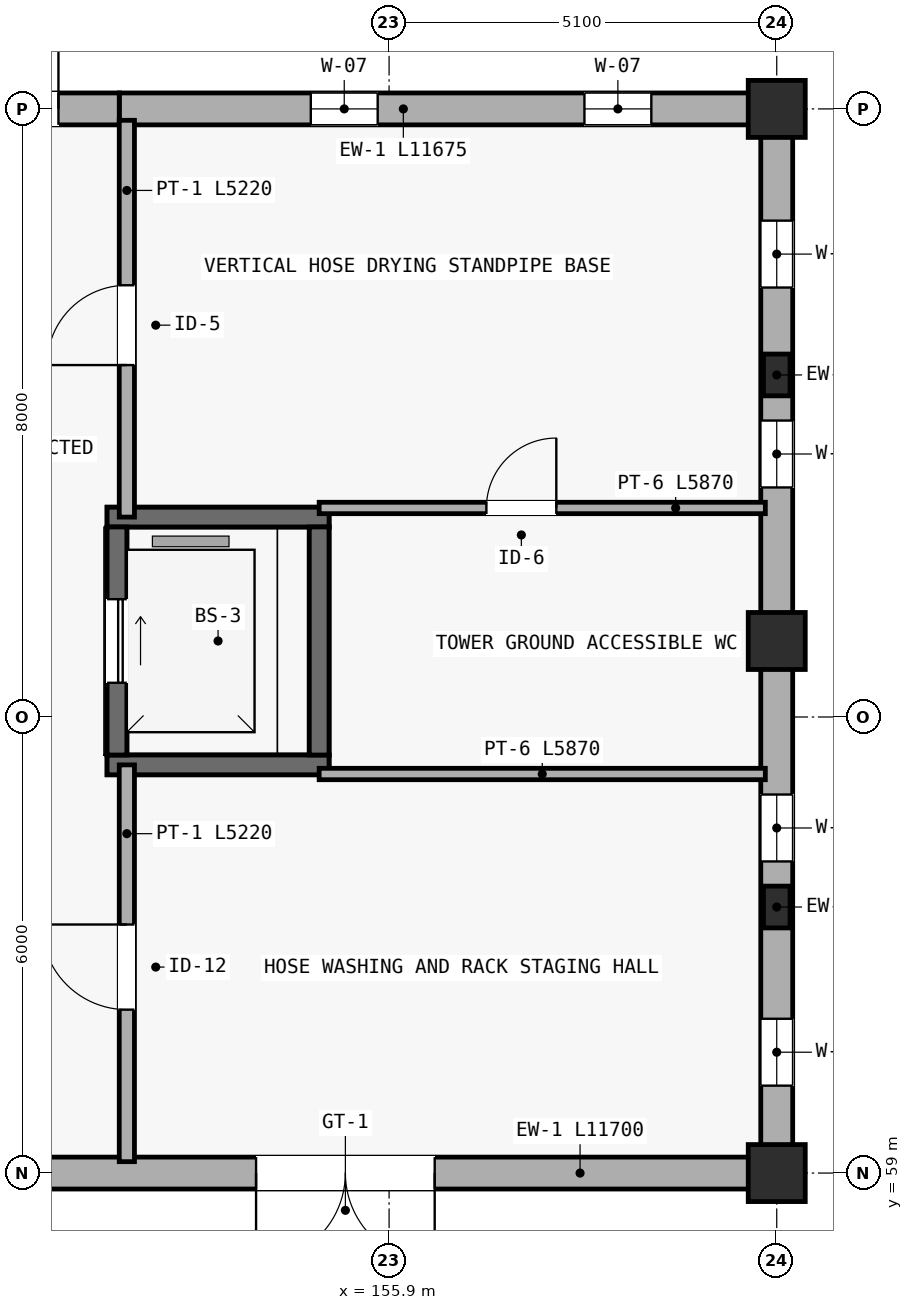
"""IFC4 building model, lengths in metres.
Left out: names, types, materials, properties, quantities, classifications, styles, units other than length and angle.
Written with IfcOpenShell. Run it as: python <this file> out.ifc"""

import sys

from ifc_helpers import new_model, si_unit, direction, frame, frame_2d, origin, origin_2d, place, context, subcontext, project, spatial, rectangle, extrude, element, fill, save


model = new_model("IFC4")
c1 = context("Model", 3, precision=1e-05, world=origin(), true_north=direction((0.0, 1.0)))
c2 = subcontext(c1, "Body", "Model", "MODEL_VIEW")
j1 = project(units=[si_unit("LENGTHUNIT", "METRE"), si_unit("PLANEANGLEUNIT", "RADIAN")], contexts=[c1])
p1 = place(None, origin())
s1 = spatial("IfcSite", under=j1, at=p1, CompositionType="ELEMENT")
p2 = place(p1, origin())
s2 = spatial("IfcBuilding", under=s1, at=p2, CompositionType="ELEMENT")
p3 = place(p2, origin())
s3 = spatial("IfcBuildingStorey", under=s2, at=p3, CompositionType="ELEMENT", Elevation=0.0)
for number, where, z_axis, x_axis in (
    (1, (161.0, 59.0, 0.0), (0.0, 0.0, 1.0), (1.0, 0.0, 0.0)),
    (2, (161.0, 66.0, 0.0), (0.0, 0.0, 1.0), (1.0, 0.0, 0.0)),
    (3, (161.0, 73.0, 0.0), (0.0, 0.0, 1.0), (1.0, 0.0, 0.0)),
):
    element("IfcColumn", number, at=place(p3, frame(where, z_axis=z_axis, x_axis=x_axis)), inside=s3, PredefinedType="COLUMN", context=c2, shape_type="SweptSolid", body=[
        extrude(rectangle(XDim=0.75, YDim=0.75, at=origin_2d()), origin(), (0.0, 0.0, 1.0), 5.85),
    ])
for number, where, z_axis, x_axis in (
    (4, (161.0, 62.5, 0.0), (0.0, 0.0, 1.0), (1.0, 0.0, 0.0)),
    (5, (161.0, 69.5, 0.0), (0.0, 0.0, 1.0), (1.0, 0.0, 0.0)),
):
    element("IfcColumn", number, at=place(p3, frame(where, z_axis=z_axis, x_axis=x_axis)), inside=s3, PredefinedType="PILASTER", context=c2, shape_type="SweptSolid", body=[
        extrude(rectangle(XDim=0.35, YDim=0.55, at=origin_2d()), origin(), (0.0, 0.0, 1.0), 5.85),
    ])
p4 = place(p3, frame((148.95, 59.0, 0.0), z_axis=(0.0, 0.0, 1.0), x_axis=(1.0, 0.0, 0.0)))
e6 = element("IfcWall", 6, at=p4, inside=s3, PredefinedType="STANDARD", context=c2, shape_type="SweptSolid", body=[
    extrude(rectangle(XDim=11.7, YDim=0.42, at=frame_2d((5.85, 0.0))), origin(), (0.0, 0.0, 1.0), 5.1),
])
p5 = place(p4, frame((0.6, 0.0, 0.0)))
e7 = element("IfcOpeningElement", 7, at=p5, cuts=e6, PredefinedType="OPENING", context=c2, shape_type="SweptSolid", body=[
    extrude(rectangle(XDim=1.75, YDim=2.2, at=frame_2d((0.875, 1.1))), frame((0.0, 0.22, 0.0), z_axis=(0.0, -1.0, 0.0), x_axis=(1.0, 0.0, 0.0)), (0.0, 0.0, 1.0), 0.44),
])
p6 = place(p4, frame((5.2, 0.0, 0.0)))
e8 = element("IfcOpeningElement", 8, at=p6, cuts=e6, PredefinedType="OPENING", context=c2, shape_type="SweptSolid", body=[
    extrude(rectangle(XDim=2.35, YDim=2.2, at=frame_2d((1.175, 1.1))), frame((0.0, 0.22, 0.0), z_axis=(0.0, -1.0, 0.0), x_axis=(1.0, 0.0, 0.0)), (0.0, 0.0, 1.0), 0.44),
])
p7 = place(p3, frame((160.65, 73.0, 0.0), z_axis=(0.0, 0.0, 1.0), x_axis=(-1.0, 0.0, 0.0)))
e9 = element("IfcWall", 9, at=p7, inside=s3, PredefinedType="STANDARD", context=c2, shape_type="SweptSolid", body=[
    extrude(rectangle(XDim=8.3, YDim=0.42, at=frame_2d((4.15, 0.0))), origin(), (0.0, 0.0, 1.0), 5.1),
])
p8 = place(p7, frame((1.3, 0.0, 0.75)))
e10 = element("IfcOpeningElement", 10, at=p8, cuts=e9, PredefinedType="OPENING", context=c2, shape_type="SweptSolid", body=[
    extrude(rectangle(XDim=0.88, YDim=1.5, at=frame_2d((0.44, 0.75))), frame((0.0, 0.22, 0.0), z_axis=(0.0, -1.0, 0.0), x_axis=(1.0, 0.0, 0.0)), (0.0, 0.0, 1.0), 0.44),
])
p9 = place(p7, frame((4.9, 0.0, 0.75)))
e11 = element("IfcOpeningElement", 11, at=p9, cuts=e9, PredefinedType="OPENING", context=c2, shape_type="SweptSolid", body=[
    extrude(rectangle(XDim=0.88, YDim=1.5, at=frame_2d((0.44, 0.75))), frame((0.0, 0.22, 0.0), z_axis=(0.0, -1.0, 0.0), x_axis=(1.0, 0.0, 0.0)), (0.0, 0.0, 1.0), 0.44),
])
p10 = place(p3, frame((152.35, 73.0, 0.0), z_axis=(0.0, 0.0, 1.0), x_axis=(-1.0, 0.0, 0.0)))
e12 = element("IfcWall", 12, at=p10, inside=s3, PredefinedType="STANDARD", context=c2, shape_type="SweptSolid", body=[
    extrude(rectangle(XDim=3.375, YDim=0.42, at=frame_2d((1.688, 0.0))), origin(), (0.0, 0.0, 1.0), 4.8),
])
p11 = place(p10, frame((0.8, 0.0, 0.0)))
e13 = element("IfcOpeningElement", 13, at=p11, cuts=e12, PredefinedType="OPENING", context=c2, shape_type="SweptSolid", body=[
    extrude(rectangle(XDim=1.75, YDim=2.2, at=frame_2d((0.875, 1.1))), frame((0.0, 0.22, 0.0), z_axis=(0.0, -1.0, 0.0), x_axis=(1.0, 0.0, 0.0)), (0.0, 0.0, 1.0), 0.44),
])
p12 = place(p3, frame((161.0, 59.35, 0.0), z_axis=(0.0, 0.0, 1.0), x_axis=(0.0, 1.0, 0.0)))
e14 = element("IfcWall", 14, at=p12, inside=s3, PredefinedType="STANDARD", context=c2, shape_type="SweptSolid", body=[
    extrude(rectangle(XDim=6.3, YDim=0.42, at=frame_2d((3.15, 0.0))), origin(), (0.0, 0.0, 1.0), 5.1),
])
p13 = place(p12, frame((0.8, 0.0, 0.75)))
e15 = element("IfcOpeningElement", 15, at=p13, cuts=e14, PredefinedType="OPENING", context=c2, shape_type="SweptSolid", body=[
    extrude(rectangle(XDim=0.88, YDim=1.5, at=frame_2d((0.44, 0.75))), frame((0.0, 0.22, 0.0), z_axis=(0.0, -1.0, 0.0), x_axis=(1.0, 0.0, 0.0)), (0.0, 0.0, 1.0), 0.44),
])
p14 = place(p12, frame((3.75, 0.0, 0.75)))
e16 = element("IfcOpeningElement", 16, at=p14, cuts=e14, PredefinedType="OPENING", context=c2, shape_type="SweptSolid", body=[
    extrude(rectangle(XDim=0.88, YDim=1.5, at=frame_2d((0.44, 0.75))), frame((0.0, 0.22, 0.0), z_axis=(0.0, -1.0, 0.0), x_axis=(1.0, 0.0, 0.0)), (0.0, 0.0, 1.0), 0.44),
])
p15 = place(p3, frame((161.0, 66.35, 0.0), z_axis=(0.0, 0.0, 1.0), x_axis=(0.0, 1.0, 0.0)))
e17 = element("IfcWall", 17, at=p15, inside=s3, PredefinedType="STANDARD", context=c2, shape_type="SweptSolid", body=[
    extrude(rectangle(XDim=6.3, YDim=0.42, at=frame_2d((3.15, 0.0))), origin(), (0.0, 0.0, 1.0), 5.1),
])
p16 = place(p15, frame((1.67, 0.0, 0.75)))
e18 = element("IfcOpeningElement", 18, at=p16, cuts=e17, PredefinedType="OPENING", context=c2, shape_type="SweptSolid", body=[
    extrude(rectangle(XDim=0.88, YDim=1.5, at=frame_2d((0.44, 0.75))), frame((0.0, 0.22, 0.0), z_axis=(0.0, -1.0, 0.0), x_axis=(1.0, 0.0, 0.0)), (0.0, 0.0, 1.0), 0.44),
])
p17 = place(p15, frame((4.3, 0.0, 0.75)))
e19 = element("IfcOpeningElement", 19, at=p17, cuts=e17, PredefinedType="OPENING", context=c2, shape_type="SweptSolid", body=[
    extrude(rectangle(XDim=0.88, YDim=1.5, at=frame_2d((0.44, 0.75))), frame((0.0, 0.22, 0.0), z_axis=(0.0, -1.0, 0.0), x_axis=(1.0, 0.0, 0.0)), (0.0, 0.0, 1.0), 0.44),
])
for number, where, z_axis, x_axis in (
    (20, (152.19, 64.37, -1.15), (0.0, 0.0, 1.0), (1.0, 0.0, 0.0)),
    (21, (155.11, 67.63, -1.15), (0.0, 0.0, 1.0), (-1.0, 0.0, 0.0)),
):
    element("IfcWall", number, at=place(p3, frame(where, z_axis=z_axis, x_axis=x_axis)), inside=s3, PredefinedType="SHEAR", context=c2, shape_type="SweptSolid", body=[
        extrude(rectangle(XDim=2.92, YDim=0.26, at=frame_2d((1.46, 0.0))), origin(), (0.0, 0.0, 1.0), 1.15),
    ])
for number, where, z_axis, x_axis in (
    (22, (152.32, 67.5, -1.15), (0.0, 0.0, 1.0), (0.0, -1.0, 0.0)),
    (23, (154.98, 64.5, -1.15), (0.0, 0.0, 1.0), (0.0, 1.0, 0.0)),
):
    element("IfcWall", number, at=place(p3, frame(where, z_axis=z_axis, x_axis=x_axis)), inside=s3, PredefinedType="SHEAR", context=c2, shape_type="SweptSolid", body=[
        extrude(rectangle(XDim=3.0, YDim=0.26, at=frame_2d((1.5, 0.0))), origin(), (0.0, 0.0, 1.0), 1.15),
    ])
for number, where, z_axis, x_axis in (
    (24, (152.19, 64.37, 0.0), (0.0, 0.0, 1.0), (1.0, 0.0, 0.0)),
    (25, (155.11, 67.63, 0.0), (0.0, 0.0, 1.0), (-1.0, 0.0, 0.0)),
):
    element("IfcWall", number, at=place(p3, frame(where, z_axis=z_axis, x_axis=x_axis)), inside=s3, PredefinedType="SHEAR", context=c2, shape_type="SweptSolid", body=[
        extrude(rectangle(XDim=2.92, YDim=0.26, at=frame_2d((1.46, 0.0))), origin(), (0.0, 0.0, 1.0), 5.6),
    ])
p18 = place(p3, frame((152.32, 67.5, 0.0), z_axis=(0.0, 0.0, 1.0), x_axis=(0.0, -1.0, 0.0)))
e26 = element("IfcWall", 26, at=p18, inside=s3, PredefinedType="SHEAR", context=c2, shape_type="SweptSolid", body=[
    extrude(rectangle(XDim=3.0, YDim=0.26, at=frame_2d((1.5, 0.0))), origin(), (0.0, 0.0, 1.0), 5.6),
])
p19 = place(p18, frame((0.95, 0.0, 0.0)))
e27 = element("IfcOpeningElement", 27, at=p19, cuts=e26, PredefinedType="OPENING", context=c2, shape_type="SweptSolid", body=[
    extrude(rectangle(XDim=1.1, YDim=2.15, at=frame_2d((0.55, 1.075))), frame((0.0, 0.14, 0.0), z_axis=(0.0, -1.0, 0.0), x_axis=(1.0, 0.0, 0.0)), (0.0, 0.0, 1.0), 0.28),
])
p20 = place(p3, frame((154.98, 64.5, 0.0), z_axis=(0.0, 0.0, 1.0), x_axis=(0.0, 1.0, 0.0)))
e28 = element("IfcWall", 28, at=p20, inside=s3, PredefinedType="SHEAR", context=c2, shape_type="SweptSolid", body=[
    extrude(rectangle(XDim=3.0, YDim=0.26, at=frame_2d((1.5, 0.0))), origin(), (0.0, 0.0, 1.0), 5.6),
])
p21 = place(p3, frame((152.45, 59.15, 0.0), z_axis=(0.0, 0.0, 1.0), x_axis=(0.0, 1.0, 0.0)))
e29 = element("IfcWall", 29, at=p21, inside=s3, PredefinedType="PARTITIONING", context=c2, shape_type="SweptSolid", body=[
    extrude(rectangle(XDim=5.22, YDim=0.2, at=frame_2d((2.61, 0.0))), origin(), (0.0, 0.0, 1.0), 5.05),
])
p22 = place(p21, frame((2.0, 0.0, 0.0)))
e30 = element("IfcOpeningElement", 30, at=p22, cuts=e29, PredefinedType="OPENING", context=c2, shape_type="SweptSolid", body=[
    extrude(rectangle(XDim=1.12, YDim=2.15, at=frame_2d((0.56, 1.075))), frame((0.0, 0.11, 0.0), z_axis=(0.0, -1.0, 0.0), x_axis=(1.0, 0.0, 0.0)), (0.0, 0.0, 1.0), 0.22),
])
p23 = place(p3, frame((152.45, 67.63, 0.0), z_axis=(0.0, 0.0, 1.0), x_axis=(0.0, 1.0, 0.0)))
e31 = element("IfcWall", 31, at=p23, inside=s3, PredefinedType="PARTITIONING", context=c2, shape_type="SweptSolid", body=[
    extrude(rectangle(XDim=5.22, YDim=0.2, at=frame_2d((2.61, 0.0))), origin(), (0.0, 0.0, 1.0), 5.05),
])
p24 = place(p23, frame((2.0, 0.0, 0.0)))
e32 = element("IfcOpeningElement", 32, at=p24, cuts=e31, PredefinedType="OPENING", context=c2, shape_type="SweptSolid", body=[
    extrude(rectangle(XDim=1.05, YDim=2.14, at=frame_2d((0.525, 1.07))), frame((0.0, 0.11, 0.0), z_axis=(0.0, -1.0, 0.0), x_axis=(1.0, 0.0, 0.0)), (0.0, 0.0, 1.0), 0.22),
])
p25 = place(p3, frame((154.98, 64.25, 0.0), z_axis=(0.0, 0.0, 1.0), x_axis=(1.0, 0.0, 0.0)))
e33 = element("IfcWall", 33, at=p25, inside=s3, PredefinedType="PARTITIONING", context=c2, shape_type="SweptSolid", body=[
    extrude(rectangle(XDim=5.87, YDim=0.15, at=frame_2d((2.935, 0.0))), origin(), (0.0, 0.0, 1.0), 5.05),
])
p26 = place(p3, frame((154.98, 67.75, 0.0), z_axis=(0.0, 0.0, 1.0), x_axis=(1.0, 0.0, 0.0)))
e34 = element("IfcWall", 34, at=p26, inside=s3, PredefinedType="PARTITIONING", context=c2, shape_type="SweptSolid", body=[
    extrude(rectangle(XDim=5.87, YDim=0.15, at=frame_2d((2.935, 0.0))), origin(), (0.0, 0.0, 1.0), 5.05),
])
p27 = place(p26, frame((2.2, 0.0, 0.0)))
e35 = element("IfcOpeningElement", 35, at=p27, cuts=e34, PredefinedType="OPENING", context=c2, shape_type="SweptSolid", body=[
    extrude(rectangle(XDim=0.92, YDim=2.1, at=frame_2d((0.46, 1.05))), frame((0.0, 0.085, 0.0), z_axis=(0.0, -1.0, 0.0), x_axis=(1.0, 0.0, 0.0)), (0.0, 0.0, 1.0), 0.17),
])
p28 = place(p6, frame((2.35, 0.0, 0.0), z_axis=(0.0, 0.0, 1.0), x_axis=(-1.0, 0.0, 0.0)))
e36 = element("IfcDoor", 36, at=p28, inside=s3, OperationType="DOUBLE_DOOR_SINGLE_SWING", PredefinedType="DOOR", context=c2, shape_type="SweptSolid", body=[
    extrude(rectangle(XDim=2.35, YDim=2.2, at=frame_2d((1.175, 1.1))), frame((0.0, 0.025, 0.0), z_axis=(0.0, -1.0, 0.0), x_axis=(1.0, 0.0, 0.0)), (0.0, 0.0, 1.0), 0.05),
])
fill(e8, e36)
p29 = place(p8, origin())
e37 = element("IfcWindow", 37, at=p29, inside=s3, PartitioningType="SINGLE_PANEL", PredefinedType="WINDOW", context=c2, shape_type="SweptSolid", body=[
    extrude(rectangle(XDim=0.88, YDim=1.5, at=frame_2d((0.44, 0.75))), frame((0.0, 0.03, 0.0), z_axis=(0.0, -1.0, 0.0), x_axis=(1.0, 0.0, 0.0)), (0.0, 0.0, 1.0), 0.06),
])
fill(e10, e37)
p30 = place(p9, origin())
e38 = element("IfcWindow", 38, at=p30, inside=s3, PartitioningType="SINGLE_PANEL", PredefinedType="WINDOW", context=c2, shape_type="SweptSolid", body=[
    extrude(rectangle(XDim=0.88, YDim=1.5, at=frame_2d((0.44, 0.75))), frame((0.0, 0.03, 0.0), z_axis=(0.0, -1.0, 0.0), x_axis=(1.0, 0.0, 0.0)), (0.0, 0.0, 1.0), 0.06),
])
fill(e11, e38)
p31 = place(p11, frame((1.75, 0.0, 0.0), z_axis=(0.0, 0.0, 1.0), x_axis=(-1.0, 0.0, 0.0)))
e39 = element("IfcDoor", 39, at=p31, inside=s3, OperationType="DOUBLE_DOOR_SINGLE_SWING", PredefinedType="DOOR", context=c2, shape_type="SweptSolid", body=[
    extrude(rectangle(XDim=1.75, YDim=2.2, at=frame_2d((0.875, 1.1))), frame((0.0, 0.025, 0.0), z_axis=(0.0, -1.0, 0.0), x_axis=(1.0, 0.0, 0.0)), (0.0, 0.0, 1.0), 0.05),
])
fill(e13, e39)
p32 = place(p13, origin())
e40 = element("IfcWindow", 40, at=p32, inside=s3, PartitioningType="SINGLE_PANEL", PredefinedType="WINDOW", context=c2, shape_type="SweptSolid", body=[
    extrude(rectangle(XDim=0.88, YDim=1.5, at=frame_2d((0.44, 0.75))), frame((0.0, 0.03, 0.0), z_axis=(0.0, -1.0, 0.0), x_axis=(1.0, 0.0, 0.0)), (0.0, 0.0, 1.0), 0.06),
])
fill(e15, e40)
p33 = place(p14, origin())
e41 = element("IfcWindow", 41, at=p33, inside=s3, PartitioningType="SINGLE_PANEL", PredefinedType="WINDOW", context=c2, shape_type="SweptSolid", body=[
    extrude(rectangle(XDim=0.88, YDim=1.5, at=frame_2d((0.44, 0.75))), frame((0.0, 0.03, 0.0), z_axis=(0.0, -1.0, 0.0), x_axis=(1.0, 0.0, 0.0)), (0.0, 0.0, 1.0), 0.06),
])
fill(e16, e41)
p34 = place(p16, origin())
e42 = element("IfcWindow", 42, at=p34, inside=s3, PartitioningType="SINGLE_PANEL", PredefinedType="WINDOW", context=c2, shape_type="SweptSolid", body=[
    extrude(rectangle(XDim=0.88, YDim=1.5, at=frame_2d((0.44, 0.75))), frame((0.0, 0.03, 0.0), z_axis=(0.0, -1.0, 0.0), x_axis=(1.0, 0.0, 0.0)), (0.0, 0.0, 1.0), 0.06),
])
fill(e18, e42)
p35 = place(p17, origin())
e43 = element("IfcWindow", 43, at=p35, inside=s3, PartitioningType="SINGLE_PANEL", PredefinedType="WINDOW", context=c2, shape_type="SweptSolid", body=[
    extrude(rectangle(XDim=0.88, YDim=1.5, at=frame_2d((0.44, 0.75))), frame((0.0, 0.03, 0.0), z_axis=(0.0, -1.0, 0.0), x_axis=(1.0, 0.0, 0.0)), (0.0, 0.0, 1.0), 0.06),
])
fill(e19, e43)
p36 = place(p19, origin())
e44 = element("IfcDoor", 44, at=p36, inside=s3, OperationType="SLIDING_TO_LEFT", PredefinedType="DOOR", context=c2, shape_type="SweptSolid", body=[
    extrude(rectangle(XDim=1.1, YDim=2.15, at=frame_2d((0.55, 1.075))), frame((0.0, 0.025, 0.0), z_axis=(0.0, -1.0, 0.0), x_axis=(1.0, 0.0, 0.0)), (0.0, 0.0, 1.0), 0.05),
])
fill(e27, e44)
p37 = place(p22, origin())
e45 = element("IfcDoor", 45, at=p37, inside=s3, OperationType="SINGLE_SWING_RIGHT", PredefinedType="DOOR", context=c2, shape_type="SweptSolid", body=[
    extrude(rectangle(XDim=1.12, YDim=2.15, at=frame_2d((0.56, 1.075))), frame((0.0, 0.025, 0.0), z_axis=(0.0, -1.0, 0.0), x_axis=(1.0, 0.0, 0.0)), (0.0, 0.0, 1.0), 0.05),
])
fill(e30, e45)
p38 = place(p24, origin())
e46 = element("IfcDoor", 46, at=p38, inside=s3, OperationType="SINGLE_SWING_LEFT", PredefinedType="DOOR", context=c2, shape_type="SweptSolid", body=[
    extrude(rectangle(XDim=1.05, YDim=2.14, at=frame_2d((0.525, 1.07))), frame((0.0, 0.025, 0.0), z_axis=(0.0, -1.0, 0.0), x_axis=(1.0, 0.0, 0.0)), (0.0, 0.0, 1.0), 0.05),
])
fill(e32, e46)
p39 = place(p27, origin())
e47 = element("IfcDoor", 47, at=p39, inside=s3, OperationType="SINGLE_SWING_RIGHT", PredefinedType="DOOR", context=c2, shape_type="SweptSolid", body=[
    extrude(rectangle(XDim=0.92, YDim=2.1, at=frame_2d((0.46, 1.05))), frame((0.0, 0.025, 0.0), z_axis=(0.0, -1.0, 0.0), x_axis=(1.0, 0.0, 0.0)), (0.0, 0.0, 1.0), 0.05),
])
fill(e35, e47)
save(model, sys.argv[1])
